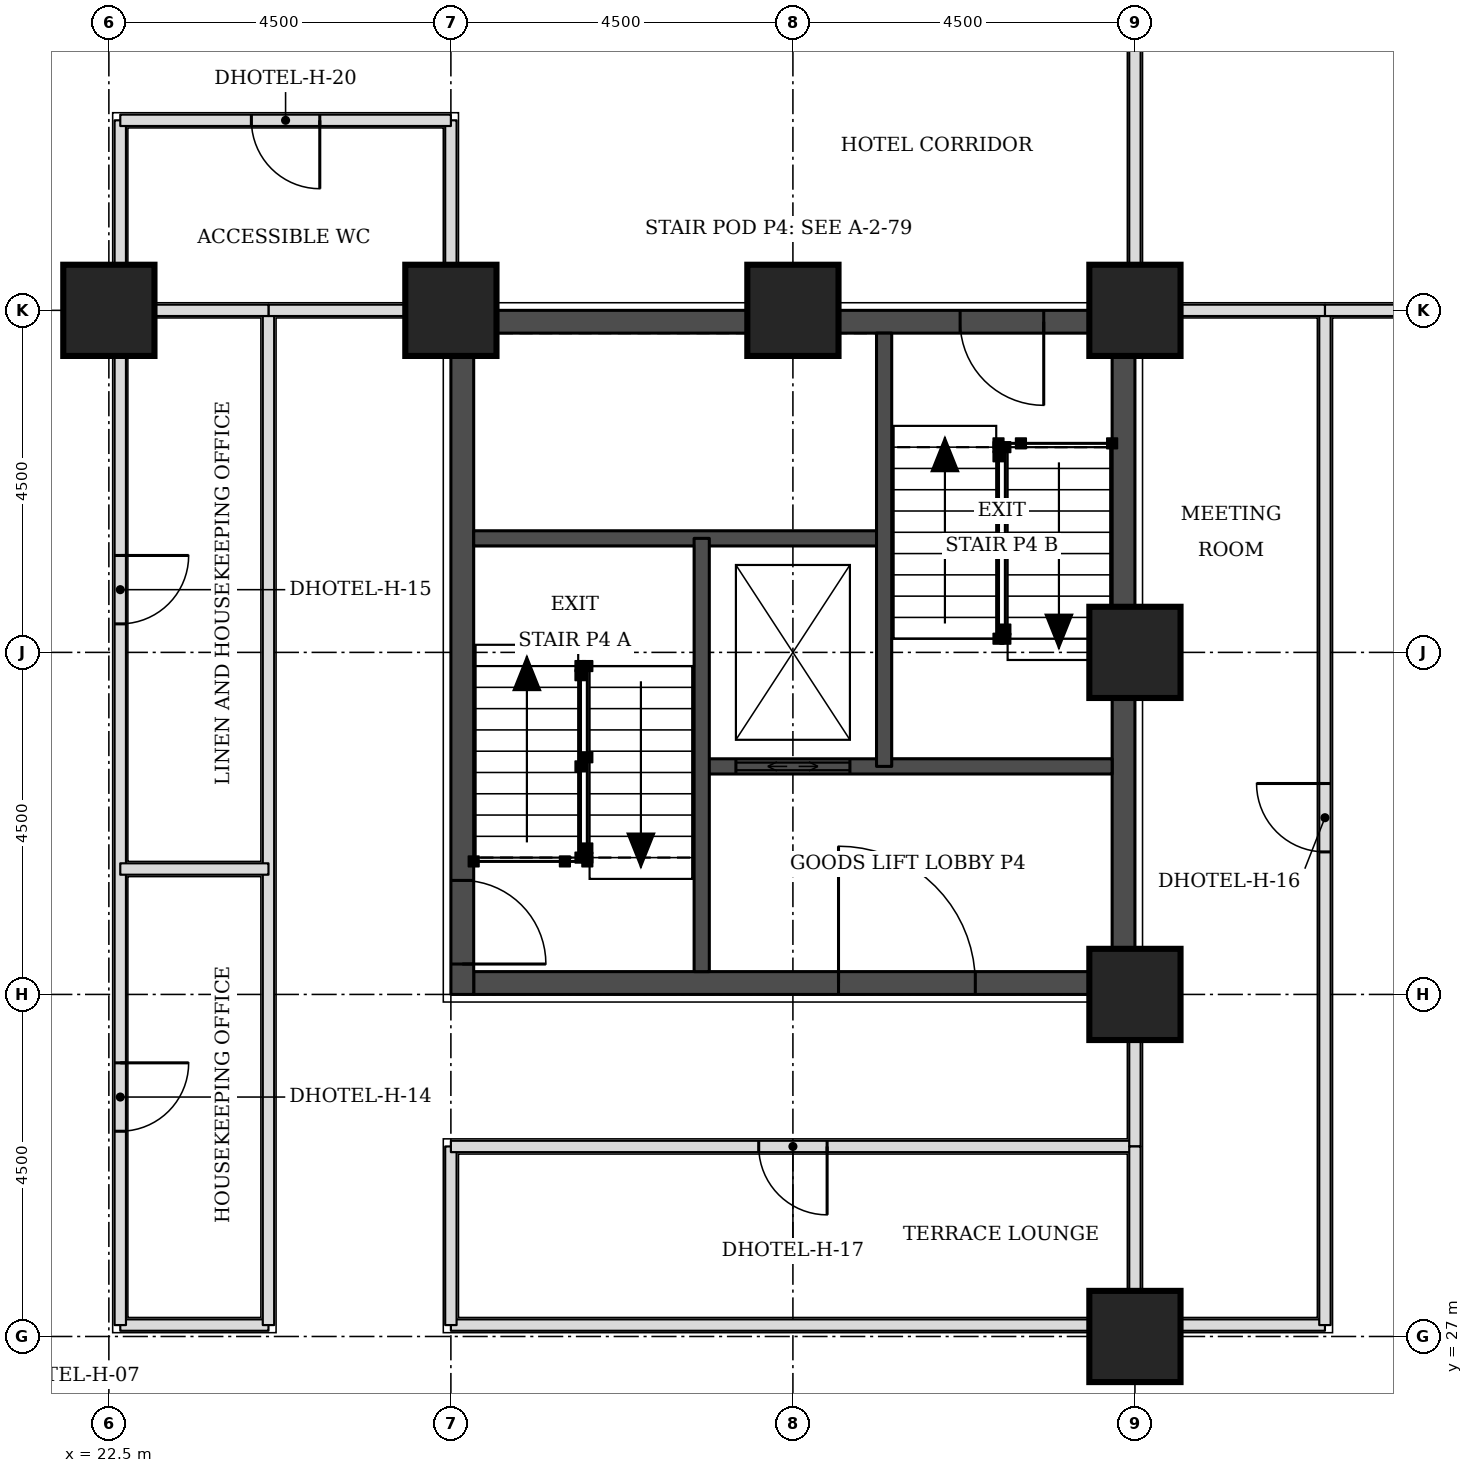
"""IFC4 building model, lengths in metres.
Left out: names, types, materials, properties, quantities, classifications, styles, units other than length and angle.
Written with IfcOpenShell. Run it as: python <this file> out.ifc"""

import sys

from ifc_helpers import new_model, si_unit, direction, frame, frame_2d, origin, origin_2d, place, context, subcontext, project, spatial, rectangle, extrude, element, fill, save


model = new_model("IFC4")
c1 = context("Model", 3, precision=1e-05, world=origin(), true_north=direction((0.0, 1.0)))
c2 = subcontext(c1, "Body", "Model", "MODEL_VIEW")
j1 = project(units=[si_unit("LENGTHUNIT", "METRE"), si_unit("PLANEANGLEUNIT", "RADIAN")], contexts=[c1])
p1 = place(None, origin())
s1 = spatial("IfcSite", under=j1, at=p1, CompositionType="ELEMENT")
p2 = place(p1, origin())
s2 = spatial("IfcBuilding", under=s1, at=p2, CompositionType="ELEMENT")
p3 = place(p2, frame((0.0, 0.0, 46.2)))
s3 = spatial("IfcBuildingStorey", under=s2, at=p3, CompositionType="ELEMENT", Elevation=46.2)
for number, where, z_axis, x_axis in (
    (1, (36.0, 27.0, 0.0), (0.0, 0.0, 1.0), (1.0, 0.0, 0.0)),
    (2, (36.0, 31.5, 0.0), (0.0, 0.0, 1.0), (1.0, 0.0, 0.0)),
    (3, (36.0, 36.0, 0.0), (0.0, 0.0, 1.0), (1.0, 0.0, 0.0)),
    (4, (22.5, 40.5, 0.0), (0.0, 0.0, 1.0), (1.0, 0.0, 0.0)),
    (5, (27.0, 40.5, 0.0), (0.0, 0.0, 1.0), (1.0, 0.0, 0.0)),
    (6, (31.5, 40.5, 0.0), (0.0, 0.0, 1.0), (1.0, 0.0, 0.0)),
    (7, (36.0, 40.5, 0.0), (0.0, 0.0, 1.0), (1.0, 0.0, 0.0)),
):
    element("IfcColumn", number, at=place(p3, frame(where, z_axis=z_axis, x_axis=x_axis)), inside=s3, PredefinedType="COLUMN", context=c2, shape_type="SweptSolid", body=[
        extrude(rectangle(XDim=1.2, YDim=1.2, at=origin_2d()), origin(), (0.0, 0.0, 1.0), 3.3),
    ])
p4 = place(p3, frame((27.3, 31.65, 0.0), z_axis=(0.0, 0.0, 1.0), x_axis=(1.0, 0.0, 0.0)))
e8 = element("IfcWall", 8, at=p4, inside=s3, PredefinedType="SHEAR", context=c2, shape_type="SweptSolid", body=[
    extrude(rectangle(XDim=8.4, YDim=0.3, at=frame_2d((4.2, 0.0))), origin(), (0.0, 0.0, 1.0), 3.3),
])
p5 = place(p4, frame((4.8, 0.0, 0.0)))
e9 = element("IfcOpeningElement", 9, at=p5, cuts=e8, PredefinedType="OPENING", context=c2, shape_type="SweptSolid", body=[
    extrude(rectangle(XDim=1.8, YDim=2.1, at=frame_2d((0.9, 1.05))), frame((0.0, 0.16, 0.0), z_axis=(0.0, -1.0, 0.0), x_axis=(1.0, 0.0, 0.0)), (0.0, 0.0, 1.0), 0.32),
])
p6 = place(p3, frame((27.3, 40.35, 0.0), z_axis=(0.0, 0.0, 1.0), x_axis=(1.0, 0.0, 0.0)))
e10 = element("IfcWall", 10, at=p6, inside=s3, PredefinedType="SHEAR", context=c2, shape_type="SweptSolid", body=[
    extrude(rectangle(XDim=8.4, YDim=0.3, at=frame_2d((4.2, 0.0))), origin(), (0.0, 0.0, 1.0), 3.3),
])
p7 = place(p6, frame((6.4, 0.0, 0.0)))
e11 = element("IfcOpeningElement", 11, at=p7, cuts=e10, PredefinedType="OPENING", context=c2, shape_type="SweptSolid", body=[
    extrude(rectangle(XDim=1.1, YDim=2.1, at=frame_2d((0.55, 1.05))), frame((0.0, 0.16, 0.0), z_axis=(0.0, -1.0, 0.0), x_axis=(1.0, 0.0, 0.0)), (0.0, 0.0, 1.0), 0.32),
])
p8 = place(p3, frame((27.15, 31.5, 0.0), z_axis=(0.0, 0.0, 1.0), x_axis=(0.0, 1.0, 0.0)))
e12 = element("IfcWall", 12, at=p8, inside=s3, PredefinedType="SHEAR", context=c2, shape_type="SweptSolid", body=[
    extrude(rectangle(XDim=9.0, YDim=0.3, at=frame_2d((4.5, 0.0))), origin(), (0.0, 0.0, 1.0), 3.3),
])
p9 = place(p8, frame((0.4, 0.0, 0.0)))
e13 = element("IfcOpeningElement", 13, at=p9, cuts=e12, PredefinedType="OPENING", context=c2, shape_type="SweptSolid", body=[
    extrude(rectangle(XDim=1.1, YDim=2.1, at=frame_2d((0.55, 1.05))), frame((0.0, 0.16, 0.0), z_axis=(0.0, -1.0, 0.0), x_axis=(1.0, 0.0, 0.0)), (0.0, 0.0, 1.0), 0.32),
])
p10 = place(p3, frame((35.85, 31.5, 0.0), z_axis=(0.0, 0.0, 1.0), x_axis=(0.0, 1.0, 0.0)))
e14 = element("IfcWall", 14, at=p10, inside=s3, PredefinedType="SHEAR", context=c2, shape_type="SweptSolid", body=[
    extrude(rectangle(XDim=9.0, YDim=0.3, at=frame_2d((4.5, 0.0))), origin(), (0.0, 0.0, 1.0), 3.3),
])
p11 = place(p3, frame((22.65, 27.15, 0.0), z_axis=(0.0, 0.0, 1.0), x_axis=(1.0, 0.0, 0.0)))
e15 = element("IfcWall", 15, at=p11, inside=s3, PredefinedType="PARTITIONING", context=c2, shape_type="SweptSolid", body=[
    extrude(rectangle(XDim=1.95, YDim=0.15, at=frame_2d((0.975, 0.0))), origin(), (0.0, 0.0, 1.0), 3.08),
])
p12 = place(p3, frame((22.65, 27.15, 0.0), z_axis=(0.0, 0.0, 1.0), x_axis=(0.0, 1.0, 0.0)))
e16 = element("IfcWall", 16, at=p12, inside=s3, PredefinedType="PARTITIONING", context=c2, shape_type="SweptSolid", body=[
    extrude(rectangle(XDim=15.85, YDim=0.15, at=frame_2d((7.925, 0.0))), origin(), (0.0, 0.0, 1.0), 3.08),
])
p13 = place(p12, frame((2.55, 0.0, 0.0)))
e17 = element("IfcOpeningElement", 17, at=p13, cuts=e16, PredefinedType="OPENING", context=c2, shape_type="SweptSolid", body=[
    extrude(rectangle(XDim=0.9, YDim=2.1, at=frame_2d((0.45, 1.05))), frame((0.0, 0.085, 0.0), z_axis=(0.0, -1.0, 0.0), x_axis=(1.0, 0.0, 0.0)), (0.0, 0.0, 1.0), 0.17),
])
p14 = place(p12, frame((9.225, 0.0, 0.0)))
e18 = element("IfcOpeningElement", 18, at=p14, cuts=e16, PredefinedType="OPENING", context=c2, shape_type="SweptSolid", body=[
    extrude(rectangle(XDim=0.9, YDim=2.1, at=frame_2d((0.45, 1.05))), frame((0.0, 0.085, 0.0), z_axis=(0.0, -1.0, 0.0), x_axis=(1.0, 0.0, 0.0)), (0.0, 0.0, 1.0), 0.17),
])
p15 = place(p3, frame((24.6, 27.15, 0.0), z_axis=(0.0, 0.0, 1.0), x_axis=(0.0, 1.0, 0.0)))
e19 = element("IfcWall", 19, at=p15, inside=s3, PredefinedType="PARTITIONING", context=c2, shape_type="SweptSolid", body=[
    extrude(rectangle(XDim=13.35, YDim=0.15, at=frame_2d((6.675, 0.0))), origin(), (0.0, 0.0, 1.0), 3.08),
])
p16 = place(p3, frame((27.0, 27.15, 0.0), z_axis=(0.0, 0.0, 1.0), x_axis=(1.0, 0.0, 0.0)))
e20 = element("IfcWall", 20, at=p16, inside=s3, PredefinedType="PARTITIONING", context=c2, shape_type="SweptSolid", body=[
    extrude(rectangle(XDim=11.5, YDim=0.15, at=frame_2d((5.75, 0.0))), origin(), (0.0, 0.0, 1.0), 3.08),
])
p17 = place(p3, frame((27.0, 27.15, 0.0), z_axis=(0.0, 0.0, 1.0), x_axis=(0.0, 1.0, 0.0)))
e21 = element("IfcWall", 21, at=p17, inside=s3, PredefinedType="PARTITIONING", context=c2, shape_type="SweptSolid", body=[
    extrude(rectangle(XDim=2.35, YDim=0.15, at=frame_2d((1.175, 0.0))), origin(), (0.0, 0.0, 1.0), 3.08),
])
p18 = place(p3, frame((38.5, 27.15, 0.0), z_axis=(0.0, 0.0, 1.0), x_axis=(0.0, 1.0, 0.0)))
e22 = element("IfcWall", 22, at=p18, inside=s3, PredefinedType="PARTITIONING", context=c2, shape_type="SweptSolid", body=[
    extrude(rectangle(XDim=13.35, YDim=0.15, at=frame_2d((6.675, 0.0))), origin(), (0.0, 0.0, 1.0), 3.08),
])
p19 = place(p18, frame((6.225, 0.0, 0.0)))
e23 = element("IfcOpeningElement", 23, at=p19, cuts=e22, PredefinedType="OPENING", context=c2, shape_type="SweptSolid", body=[
    extrude(rectangle(XDim=0.9, YDim=2.1, at=frame_2d((0.45, 1.05))), frame((0.0, 0.085, 0.0), z_axis=(0.0, -1.0, 0.0), x_axis=(1.0, 0.0, 0.0)), (0.0, 0.0, 1.0), 0.17),
])
p20 = place(p3, frame((27.0, 29.5, 0.0), z_axis=(0.0, 0.0, 1.0), x_axis=(1.0, 0.0, 0.0)))
e24 = element("IfcWall", 24, at=p20, inside=s3, PredefinedType="PARTITIONING", context=c2, shape_type="SweptSolid", body=[
    extrude(rectangle(XDim=9.0, YDim=0.15, at=frame_2d((4.5, 0.0))), origin(), (0.0, 0.0, 1.0), 3.08),
])
p21 = place(p20, frame((4.05, 0.0, 0.0)))
e25 = element("IfcOpeningElement", 25, at=p21, cuts=e24, PredefinedType="OPENING", context=c2, shape_type="SweptSolid", body=[
    extrude(rectangle(XDim=0.9, YDim=2.1, at=frame_2d((0.45, 1.05))), frame((0.0, 0.085, 0.0), z_axis=(0.0, -1.0, 0.0), x_axis=(1.0, 0.0, 0.0)), (0.0, 0.0, 1.0), 0.17),
])
p22 = place(p3, frame((36.0, 29.5, 0.0), z_axis=(0.0, 0.0, 1.0), x_axis=(0.0, 1.0, 0.0)))
e26 = element("IfcWall", 26, at=p22, inside=s3, PredefinedType="PARTITIONING", context=c2, shape_type="SweptSolid", body=[
    extrude(rectangle(XDim=1.95, YDim=0.15, at=frame_2d((0.975, 0.0))), origin(), (0.0, 0.0, 1.0), 2.33),
])
p23 = place(p3, frame((24.6, 40.5, 0.0), z_axis=(0.0, 0.0, 1.0), x_axis=(1.0, 0.0, 0.0)))
e27 = element("IfcWall", 27, at=p23, inside=s3, PredefinedType="PARTITIONING", context=c2, shape_type="SweptSolid", body=[
    extrude(rectangle(XDim=2.35, YDim=0.15, at=frame_2d((1.175, 0.0))), origin(), (0.0, 0.0, 1.0), 2.33),
])
p24 = place(p3, frame((38.5, 40.5, 0.0), z_axis=(0.0, 0.0, 1.0), x_axis=(1.0, 0.0, 0.0)))
e28 = element("IfcWall", 28, at=p24, inside=s3, PredefinedType="PARTITIONING", context=c2, shape_type="SweptSolid", body=[
    extrude(rectangle(XDim=1.95, YDim=0.15, at=frame_2d((0.975, 0.0))), origin(), (0.0, 0.0, 1.0), 2.33),
])
p25 = place(p3, frame((27.0, 40.55, 0.0), z_axis=(0.0, 0.0, 1.0), x_axis=(0.0, 1.0, 0.0)))
e29 = element("IfcWall", 29, at=p25, inside=s3, PredefinedType="PARTITIONING", context=c2, shape_type="SweptSolid", body=[
    extrude(rectangle(XDim=2.45, YDim=0.15, at=frame_2d((1.225, 0.0))), origin(), (0.0, 0.0, 1.0), 3.08),
])
p26 = place(p3, frame((36.0, 40.55, 0.0), z_axis=(0.0, 0.0, 1.0), x_axis=(0.0, 1.0, 0.0)))
e30 = element("IfcWall", 30, at=p26, inside=s3, PredefinedType="PARTITIONING", context=c2, shape_type="SweptSolid", body=[
    extrude(rectangle(XDim=4.4, YDim=0.15, at=frame_2d((2.2, 0.0))), origin(), (0.0, 0.0, 1.0), 2.33),
])
p27 = place(p3, frame((22.65, 43.0, 0.0), z_axis=(0.0, 0.0, 1.0), x_axis=(1.0, 0.0, 0.0)))
e31 = element("IfcWall", 31, at=p27, inside=s3, PredefinedType="PARTITIONING", context=c2, shape_type="SweptSolid", body=[
    extrude(rectangle(XDim=4.35, YDim=0.15, at=frame_2d((2.175, 0.0))), origin(), (0.0, 0.0, 1.0), 3.08),
])
p28 = place(p27, frame((1.725, 0.0, 0.0)))
e32 = element("IfcOpeningElement", 32, at=p28, cuts=e31, PredefinedType="OPENING", context=c2, shape_type="SweptSolid", body=[
    extrude(rectangle(XDim=0.9, YDim=2.1, at=frame_2d((0.45, 1.05))), frame((0.0, 0.085, 0.0), z_axis=(0.0, -1.0, 0.0), x_axis=(1.0, 0.0, 0.0)), (0.0, 0.0, 1.0), 0.17),
])
p29 = place(p3, frame((36.0, 27.15, 0.0), z_axis=(0.0, 0.0, 1.0), x_axis=(0.0, 1.0, 0.0)))
e33 = element("IfcWall", 33, at=p29, inside=s3, PredefinedType="PARTITIONING", context=c2, shape_type="SweptSolid", body=[
    extrude(rectangle(XDim=2.35, YDim=0.15, at=frame_2d((1.175, 0.0))), origin(), (0.0, 0.0, 1.0), 2.33),
])
p30 = place(p3, frame((22.65, 33.15, 0.0), z_axis=(0.0, 0.0, 1.0), x_axis=(1.0, 0.0, 0.0)))
e34 = element("IfcWall", 34, at=p30, inside=s3, PredefinedType="PARTITIONING", context=c2, shape_type="SweptSolid", body=[
    extrude(rectangle(XDim=1.95, YDim=0.15, at=frame_2d((0.975, 0.0))), origin(), (0.0, 0.0, 1.0), 3.08),
])
p31 = place(p3, frame((22.65, 40.5, 0.0), z_axis=(0.0, 0.0, 1.0), x_axis=(1.0, 0.0, 0.0)))
e35 = element("IfcWall", 35, at=p31, inside=s3, PredefinedType="PARTITIONING", context=c2, shape_type="SweptSolid", body=[
    extrude(rectangle(XDim=1.95, YDim=0.15, at=frame_2d((0.975, 0.0))), origin(), (0.0, 0.0, 1.0), 2.33),
])
p32 = place(p3, frame((36.05, 40.5, 0.0), z_axis=(0.0, 0.0, 1.0), x_axis=(1.0, 0.0, 0.0)))
e36 = element("IfcWall", 36, at=p32, inside=s3, PredefinedType="PARTITIONING", context=c2, shape_type="SweptSolid", body=[
    extrude(rectangle(XDim=2.45, YDim=0.15, at=frame_2d((1.225, 0.0))), origin(), (0.0, 0.0, 1.0), 2.33),
])
p33 = place(p3, frame((30.3, 34.5, 0.0), z_axis=(0.0, 0.0, 1.0), x_axis=(1.0, 0.0, 0.0)))
e37 = element("IfcWall", 37, at=p33, inside=s3, PredefinedType="SOLIDWALL", context=c2, shape_type="SweptSolid", body=[
    extrude(rectangle(XDim=5.4, YDim=0.2, at=frame_2d((2.7, 0.0))), origin(), (0.0, 0.0, 1.0), 3.08),
])
p34 = place(p33, frame((0.45, 0.0, 0.0)))
e38 = element("IfcOpeningElement", 38, at=p34, cuts=e37, PredefinedType="OPENING", context=c2, shape_type="SweptSolid", body=[
    extrude(rectangle(XDim=1.5, YDim=2.1, at=frame_2d((0.75, 1.05))), frame((0.0, 0.11, 0.0), z_axis=(0.0, -1.0, 0.0), x_axis=(1.0, 0.0, 0.0)), (0.0, 0.0, 1.0), 0.22),
])
p35 = place(p3, frame((27.3, 37.5, 0.0), z_axis=(0.0, 0.0, 1.0), x_axis=(1.0, 0.0, 0.0)))
e39 = element("IfcWall", 39, at=p35, inside=s3, PredefinedType="SOLIDWALL", context=c2, shape_type="SweptSolid", body=[
    extrude(rectangle(XDim=5.4, YDim=0.2, at=frame_2d((2.7, 0.0))), origin(), (0.0, 0.0, 1.0), 3.08),
])
for number, where, z_axis, x_axis in (
    (40, (30.3, 31.8, 0.0), (0.0, 0.0, 1.0), (0.0, 1.0, 0.0)),
    (41, (32.7, 34.5, 0.0), (0.0, 0.0, 1.0), (0.0, 1.0, 0.0)),
):
    element("IfcWall", number, at=place(p3, frame(where, z_axis=z_axis, x_axis=x_axis)), inside=s3, PredefinedType="SOLIDWALL", context=c2, shape_type="SweptSolid", body=[
        extrude(rectangle(XDim=5.7, YDim=0.2, at=frame_2d((2.85, 0.0))), origin(), (0.0, 0.0, 1.0), 3.08),
    ])
p36 = place(p13, frame((0.9, 0.0, 0.0), z_axis=(0.0, 0.0, 1.0), x_axis=(-1.0, 0.0, 0.0)))
e42 = element("IfcDoor", 42, at=p36, inside=s3, OperationType="SINGLE_SWING_LEFT", PredefinedType="DOOR", context=c2, shape_type="SweptSolid", body=[
    extrude(rectangle(XDim=0.9, YDim=2.1, at=frame_2d((0.45, 1.05))), frame((0.0, 0.025, 0.0), z_axis=(0.0, -1.0, 0.0), x_axis=(1.0, 0.0, 0.0)), (0.0, 0.0, 1.0), 0.05),
])
fill(e17, e42)
p37 = place(p14, frame((0.9, 0.0, 0.0), z_axis=(0.0, 0.0, 1.0), x_axis=(-1.0, 0.0, 0.0)))
e43 = element("IfcDoor", 43, at=p37, inside=s3, OperationType="SINGLE_SWING_LEFT", PredefinedType="DOOR", context=c2, shape_type="SweptSolid", body=[
    extrude(rectangle(XDim=0.9, YDim=2.1, at=frame_2d((0.45, 1.05))), frame((0.0, 0.025, 0.0), z_axis=(0.0, -1.0, 0.0), x_axis=(1.0, 0.0, 0.0)), (0.0, 0.0, 1.0), 0.05),
])
fill(e18, e43)
p38 = place(p21, frame((0.9, 0.0, 0.0), z_axis=(0.0, 0.0, 1.0), x_axis=(-1.0, 0.0, 0.0)))
e44 = element("IfcDoor", 44, at=p38, inside=s3, OperationType="SINGLE_SWING_LEFT", PredefinedType="DOOR", context=c2, shape_type="SweptSolid", body=[
    extrude(rectangle(XDim=0.9, YDim=2.1, at=frame_2d((0.45, 1.05))), frame((0.0, 0.025, 0.0), z_axis=(0.0, -1.0, 0.0), x_axis=(1.0, 0.0, 0.0)), (0.0, 0.0, 1.0), 0.05),
])
fill(e25, e44)
p39 = place(p19, origin())
e45 = element("IfcDoor", 45, at=p39, inside=s3, OperationType="SINGLE_SWING_RIGHT", PredefinedType="DOOR", context=c2, shape_type="SweptSolid", body=[
    extrude(rectangle(XDim=0.9, YDim=2.1, at=frame_2d((0.45, 1.05))), frame((0.0, 0.025, 0.0), z_axis=(0.0, -1.0, 0.0), x_axis=(1.0, 0.0, 0.0)), (0.0, 0.0, 1.0), 0.05),
])
fill(e23, e45)
p40 = place(p28, frame((0.9, 0.0, 0.0), z_axis=(0.0, 0.0, 1.0), x_axis=(-1.0, 0.0, 0.0)))
e46 = element("IfcDoor", 46, at=p40, inside=s3, OperationType="SINGLE_SWING_LEFT", PredefinedType="DOOR", context=c2, shape_type="SweptSolid", body=[
    extrude(rectangle(XDim=0.9, YDim=2.1, at=frame_2d((0.45, 1.05))), frame((0.0, 0.025, 0.0), z_axis=(0.0, -1.0, 0.0), x_axis=(1.0, 0.0, 0.0)), (0.0, 0.0, 1.0), 0.05),
])
fill(e32, e46)
p41 = place(p9, frame((1.1, 0.0, 0.0), z_axis=(0.0, 0.0, 1.0), x_axis=(-1.0, 0.0, 0.0)))
e47 = element("IfcDoor", 47, at=p41, inside=s3, OperationType="SINGLE_SWING_RIGHT", PredefinedType="DOOR", context=c2, shape_type="SweptSolid", body=[
    extrude(rectangle(XDim=1.1, YDim=2.1, at=frame_2d((0.55, 1.05))), frame((0.0, 0.025, 0.0), z_axis=(0.0, -1.0, 0.0), x_axis=(1.0, 0.0, 0.0)), (0.0, 0.0, 1.0), 0.05),
])
fill(e13, e47)
p42 = place(p7, frame((1.1, 0.0, 0.0), z_axis=(0.0, 0.0, 1.0), x_axis=(-1.0, 0.0, 0.0)))
e48 = element("IfcDoor", 48, at=p42, inside=s3, OperationType="SINGLE_SWING_LEFT", PredefinedType="DOOR", context=c2, shape_type="SweptSolid", body=[
    extrude(rectangle(XDim=1.1, YDim=2.1, at=frame_2d((0.55, 1.05))), frame((0.0, 0.025, 0.0), z_axis=(0.0, -1.0, 0.0), x_axis=(1.0, 0.0, 0.0)), (0.0, 0.0, 1.0), 0.05),
])
fill(e11, e48)
p43 = place(p34, origin())
e49 = element("IfcDoor", 49, at=p43, inside=s3, OperationType="DOUBLE_DOOR_SLIDING", PredefinedType="DOOR", context=c2, shape_type="SweptSolid", body=[
    extrude(rectangle(XDim=1.5, YDim=2.1, at=frame_2d((0.75, 1.05))), frame((0.0, 0.025, 0.0), z_axis=(0.0, -1.0, 0.0), x_axis=(1.0, 0.0, 0.0)), (0.0, 0.0, 1.0), 0.05),
])
fill(e38, e49)
p44 = place(p5, origin())
e50 = element("IfcDoor", 50, at=p44, inside=s3, OperationType="SINGLE_SWING_LEFT", PredefinedType="DOOR", context=c2, shape_type="SweptSolid", body=[
    extrude(rectangle(XDim=1.8, YDim=2.1, at=frame_2d((0.9, 1.05))), frame((0.0, 0.025, 0.0), z_axis=(0.0, -1.0, 0.0), x_axis=(1.0, 0.0, 0.0)), (0.0, 0.0, 1.0), 0.05),
])
fill(e9, e50)
save(model, sys.argv[1])
